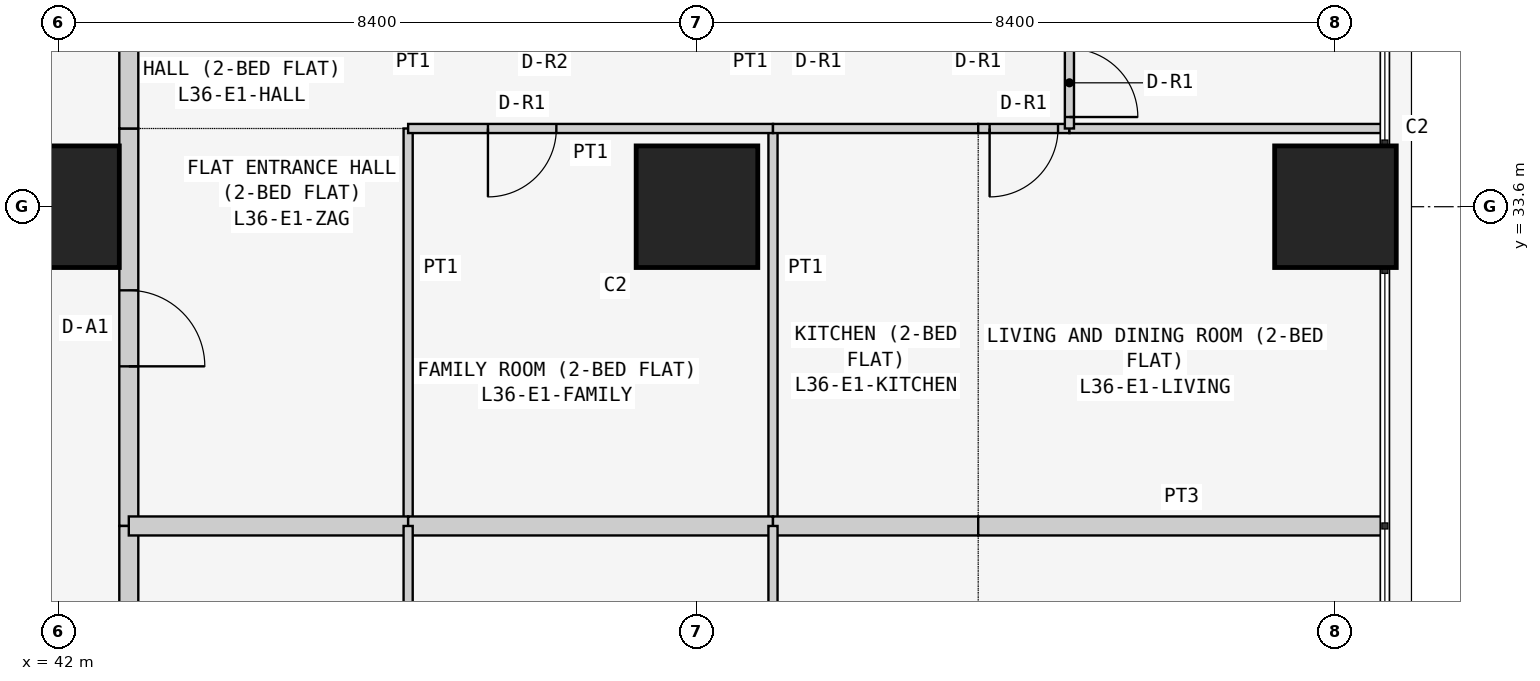
"""IFC4 building model, lengths in metres.
Left out: names, types, materials, properties, quantities, classifications, styles, units other than length and angle.
Written with IfcOpenShell. Run it as: python <this file> out.ifc"""

import sys

from ifc_helpers import new_model, si_unit, direction, frame, frame_2d, origin, origin_2d, place, context, subcontext, project, spatial, rectangle, extrude, element, fill, save


model = new_model("IFC4")
c1 = context("Model", 3, precision=1e-05, world=origin(), true_north=direction((0.0, 1.0)))
c2 = subcontext(c1, "Body", "Model", "MODEL_VIEW")
j1 = project(units=[si_unit("LENGTHUNIT", "METRE"), si_unit("PLANEANGLEUNIT", "RADIAN")], contexts=[c1])
p1 = place(None, origin())
s1 = spatial("IfcSite", under=j1, at=p1, CompositionType="ELEMENT")
p2 = place(p1, origin())
s2 = spatial("IfcBuilding", under=s1, at=p2, CompositionType="ELEMENT")
p3 = place(p2, frame((0.0, 0.0, 141.3)))
s3 = spatial("IfcBuildingStorey", under=s2, at=p3, CompositionType="ELEMENT", Elevation=141.3)
for number, where, z_axis, x_axis in (
    (1, (42.0, 33.6, 0.0), (0.0, 0.0, 1.0), (1.0, 0.0, 0.0)),
    (2, (50.4, 33.6, 0.0), (0.0, 0.0, 1.0), (1.0, 0.0, 0.0)),
    (3, (58.8, 33.6, 0.0), (0.0, 0.0, 1.0), (1.0, 0.0, 0.0)),
):
    element("IfcColumn", number, at=place(p3, frame(where, z_axis=z_axis, x_axis=x_axis)), inside=s3, PredefinedType="COLUMN", context=c2, shape_type="SweptSolid", body=[
        extrude(rectangle(XDim=1.6, YDim=1.6, at=origin_2d()), origin(), (0.0, 0.0, 1.0), 3.6),
    ])
p4 = place(p3, frame((42.925, 34.629, 0.0), z_axis=(0.0, 0.0, 1.0), x_axis=(0.0, -1.0, 0.0)))
e4 = element("IfcWall", 4, at=p4, inside=s3, PredefinedType="PARTITIONING", context=c2, shape_type="SweptSolid", body=[
    extrude(rectangle(XDim=5.229, YDim=0.25, at=frame_2d((2.615, 0.0))), origin(), (0.0, 0.0, 1.0), 3.45),
])
p5 = place(p4, frame((2.129, 0.0, 0.0)))
e5 = element("IfcOpeningElement", 5, at=p5, cuts=e4, PredefinedType="OPENING", context=c2, shape_type="SweptSolid", body=[
    extrude(rectangle(XDim=1.0, YDim=2.1, at=frame_2d((0.5, 1.05))), frame((0.0, 0.135, 0.0), z_axis=(0.0, -1.0, 0.0), x_axis=(1.0, 0.0, 0.0)), (0.0, 0.0, 1.0), 0.27),
])
p6 = place(p3, frame((42.925, 35.829, 0.0), z_axis=(0.0, 0.0, 1.0), x_axis=(0.0, -1.0, 0.0)))
e6 = element("IfcWall", 6, at=p6, inside=s3, PredefinedType="PARTITIONING", context=c2, shape_type="SweptSolid", body=[
    extrude(rectangle(XDim=1.2, YDim=0.25, at=frame_2d((0.6, 0.0))), origin(), (0.0, 0.0, 1.0), 3.45),
])
p7 = place(p3, frame((42.925, 29.4, 0.0), z_axis=(0.0, 0.0, 1.0), x_axis=(0.0, -1.0, 0.0)))
e7 = element("IfcWall", 7, at=p7, inside=s3, PredefinedType="PARTITIONING", context=c2, shape_type="SweptSolid", body=[
    extrude(rectangle(XDim=5.229, YDim=0.25, at=frame_2d((2.615, 0.0))), origin(), (0.0, 0.0, 1.0), 3.45),
])
p8 = place(p7, frame((2.1, 0.0, 0.0)))
e8 = element("IfcOpeningElement", 8, at=p8, cuts=e7, PredefinedType="OPENING", context=c2, shape_type="SweptSolid", body=[
    extrude(rectangle(XDim=1.0, YDim=2.1, at=frame_2d((0.5, 1.05))), frame((0.0, 0.135, 0.0), z_axis=(0.0, -1.0, 0.0), x_axis=(1.0, 0.0, 0.0)), (0.0, 0.0, 1.0), 0.27),
])
p9 = place(p3, frame((46.6, 29.4, 0.0), z_axis=(0.0, 0.0, 1.0), x_axis=(0.0, 1.0, 0.0)))
e9 = element("IfcWall", 9, at=p9, inside=s3, PredefinedType="PARTITIONING", context=c2, shape_type="SweptSolid", body=[
    extrude(rectangle(XDim=5.229, YDim=0.12, at=frame_2d((2.615, 0.0))), origin(), (0.0, 0.0, 1.0), 3.45),
])
p10 = place(p3, frame((42.925, 29.4, 0.0), z_axis=(0.0, 0.0, 1.0), x_axis=(1.0, 0.0, 0.0)))
e10 = element("IfcWall", 10, at=p10, inside=s3, PredefinedType="PARTITIONING", context=c2, shape_type="SweptSolid", body=[
    extrude(rectangle(XDim=3.675, YDim=0.25, at=frame_2d((1.837, 0.0))), origin(), (0.0, 0.0, 1.0), 3.45),
])
p11 = place(p3, frame((51.4, 29.4, 0.0), z_axis=(0.0, 0.0, 1.0), x_axis=(0.0, 1.0, 0.0)))
e11 = element("IfcWall", 11, at=p11, inside=s3, PredefinedType="PARTITIONING", context=c2, shape_type="SweptSolid", body=[
    extrude(rectangle(XDim=5.229, YDim=0.12, at=frame_2d((2.615, 0.0))), origin(), (0.0, 0.0, 1.0), 3.45),
])
p12 = place(p3, frame((51.4, 34.629, 0.0), z_axis=(0.0, 0.0, 1.0), x_axis=(-1.0, 0.0, 0.0)))
e12 = element("IfcWall", 12, at=p12, inside=s3, PredefinedType="PARTITIONING", context=c2, shape_type="SweptSolid", body=[
    extrude(rectangle(XDim=4.8, YDim=0.12, at=frame_2d((2.4, 0.0))), origin(), (0.0, 0.0, 1.0), 3.45),
])
p13 = place(p12, frame((2.85, 0.0, 0.0)))
e13 = element("IfcOpeningElement", 13, at=p13, cuts=e12, PredefinedType="OPENING", context=c2, shape_type="SweptSolid", body=[
    extrude(rectangle(XDim=0.9, YDim=2.1, at=frame_2d((0.45, 1.05))), frame((0.0, 0.07, 0.0), z_axis=(0.0, -1.0, 0.0), x_axis=(1.0, 0.0, 0.0)), (0.0, 0.0, 1.0), 0.14),
])
p14 = place(p3, frame((46.6, 29.4, 0.0), z_axis=(0.0, 0.0, 1.0), x_axis=(1.0, 0.0, 0.0)))
e14 = element("IfcWall", 14, at=p14, inside=s3, PredefinedType="PARTITIONING", context=c2, shape_type="SweptSolid", body=[
    extrude(rectangle(XDim=4.8, YDim=0.25, at=frame_2d((2.4, 0.0))), origin(), (0.0, 0.0, 1.0), 3.45),
])
p15 = place(p3, frame((54.1, 34.629, 0.0), z_axis=(0.0, 0.0, 1.0), x_axis=(-1.0, 0.0, 0.0)))
e15 = element("IfcWall", 15, at=p15, inside=s3, PredefinedType="PARTITIONING", context=c2, shape_type="SweptSolid", body=[
    extrude(rectangle(XDim=2.7, YDim=0.12, at=frame_2d((1.35, 0.0))), origin(), (0.0, 0.0, 1.0), 3.45),
])
p16 = place(p3, frame((51.4, 29.4, 0.0), z_axis=(0.0, 0.0, 1.0), x_axis=(1.0, 0.0, 0.0)))
e16 = element("IfcWall", 16, at=p16, inside=s3, PredefinedType="PARTITIONING", context=c2, shape_type="SweptSolid", body=[
    extrude(rectangle(XDim=2.7, YDim=0.25, at=frame_2d((1.35, 0.0))), origin(), (0.0, 0.0, 1.0), 3.45),
])
p17 = place(p3, frame((55.3, 34.629, 0.0), z_axis=(0.0, 0.0, 1.0), x_axis=(-1.0, 0.0, 0.0)))
e17 = element("IfcWall", 17, at=p17, inside=s3, PredefinedType="PARTITIONING", context=c2, shape_type="SweptSolid", body=[
    extrude(rectangle(XDim=1.2, YDim=0.12, at=frame_2d((0.6, 0.0))), origin(), (0.0, 0.0, 1.0), 3.45),
])
p18 = place(p17, frame((0.15, 0.0, 0.0)))
e18 = element("IfcOpeningElement", 18, at=p18, cuts=e17, PredefinedType="OPENING", context=c2, shape_type="SweptSolid", body=[
    extrude(rectangle(XDim=0.9, YDim=2.1, at=frame_2d((0.45, 1.05))), frame((0.0, 0.07, 0.0), z_axis=(0.0, -1.0, 0.0), x_axis=(1.0, 0.0, 0.0)), (0.0, 0.0, 1.0), 0.14),
])
p19 = place(p3, frame((59.45, 34.629, 0.0), z_axis=(0.0, 0.0, 1.0), x_axis=(-1.0, 0.0, 0.0)))
e19 = element("IfcWall", 19, at=p19, inside=s3, PredefinedType="PARTITIONING", context=c2, shape_type="SweptSolid", body=[
    extrude(rectangle(XDim=4.15, YDim=0.12, at=frame_2d((2.075, 0.0))), origin(), (0.0, 0.0, 1.0), 3.45),
])
p20 = place(p3, frame((54.1, 29.4, 0.0), z_axis=(0.0, 0.0, 1.0), x_axis=(1.0, 0.0, 0.0)))
e20 = element("IfcWall", 20, at=p20, inside=s3, PredefinedType="PARTITIONING", context=c2, shape_type="SweptSolid", body=[
    extrude(rectangle(XDim=5.35, YDim=0.25, at=frame_2d((2.675, 0.0))), origin(), (0.0, 0.0, 1.0), 3.45),
])
p21 = place(p3, frame((55.3, 34.629, 0.0), z_axis=(0.0, 0.0, 1.0), x_axis=(0.0, 1.0, 0.0)))
e21 = element("IfcWall", 21, at=p21, inside=s3, PredefinedType="PARTITIONING", context=c2, shape_type="SweptSolid", body=[
    extrude(rectangle(XDim=1.2, YDim=0.12, at=frame_2d((0.6, 0.0))), origin(), (0.0, 0.0, 1.0), 3.45),
])
p22 = place(p21, frame((0.151, 0.0, 0.0)))
e22 = element("IfcOpeningElement", 22, at=p22, cuts=e21, PredefinedType="OPENING", context=c2, shape_type="SweptSolid", body=[
    extrude(rectangle(XDim=0.9, YDim=2.1, at=frame_2d((0.45, 1.05))), frame((0.0, 0.07, 0.0), z_axis=(0.0, -1.0, 0.0), x_axis=(1.0, 0.0, 0.0)), (0.0, 0.0, 1.0), 0.14),
])
for number, where, z_axis, x_axis in (
    (23, (46.6, 29.4, 0.0), (0.0, 0.0, 1.0), (0.0, -1.0, 0.0)),
    (24, (51.4, 29.4, 0.0), (0.0, 0.0, 1.0), (0.0, -1.0, 0.0)),
):
    element("IfcWall", number, at=place(p3, frame(where, z_axis=z_axis, x_axis=x_axis)), inside=s3, PredefinedType="PARTITIONING", context=c2, shape_type="SweptSolid", body=[
        extrude(rectangle(XDim=5.229, YDim=0.12, at=frame_2d((2.615, 0.0))), origin(), (0.0, 0.0, 1.0), 3.45),
    ])
p23 = place(p5, origin())
e25 = element("IfcDoor", 25, at=p23, inside=s3, OperationType="SINGLE_SWING_RIGHT", PredefinedType="DOOR", context=c2, shape_type="SweptSolid", body=[
    extrude(rectangle(XDim=1.0, YDim=2.1, at=frame_2d((0.5, 1.05))), frame((0.0, 0.025, 0.0), z_axis=(0.0, -1.0, 0.0), x_axis=(1.0, 0.0, 0.0)), (0.0, 0.0, 1.0), 0.05),
])
fill(e5, e25)
p24 = place(p13, origin())
e26 = element("IfcDoor", 26, at=p24, inside=s3, OperationType="SINGLE_SWING_RIGHT", PredefinedType="DOOR", context=c2, shape_type="SweptSolid", body=[
    extrude(rectangle(XDim=0.9, YDim=2.1, at=frame_2d((0.45, 1.05))), frame((0.0, 0.025, 0.0), z_axis=(0.0, -1.0, 0.0), x_axis=(1.0, 0.0, 0.0)), (0.0, 0.0, 1.0), 0.05),
])
fill(e13, e26)
p25 = place(p18, origin())
e27 = element("IfcDoor", 27, at=p25, inside=s3, OperationType="SINGLE_SWING_RIGHT", PredefinedType="DOOR", context=c2, shape_type="SweptSolid", body=[
    extrude(rectangle(XDim=0.9, YDim=2.1, at=frame_2d((0.45, 1.05))), frame((0.0, 0.025, 0.0), z_axis=(0.0, -1.0, 0.0), x_axis=(1.0, 0.0, 0.0)), (0.0, 0.0, 1.0), 0.05),
])
fill(e18, e27)
p26 = place(p22, frame((0.9, 0.0, 0.0), z_axis=(0.0, 0.0, 1.0), x_axis=(-1.0, 0.0, 0.0)))
e28 = element("IfcDoor", 28, at=p26, inside=s3, OperationType="SINGLE_SWING_RIGHT", PredefinedType="DOOR", context=c2, shape_type="SweptSolid", body=[
    extrude(rectangle(XDim=0.9, YDim=2.1, at=frame_2d((0.45, 1.05))), frame((0.0, 0.025, 0.0), z_axis=(0.0, -1.0, 0.0), x_axis=(1.0, 0.0, 0.0)), (0.0, 0.0, 1.0), 0.05),
])
fill(e22, e28)
save(model, sys.argv[1])
